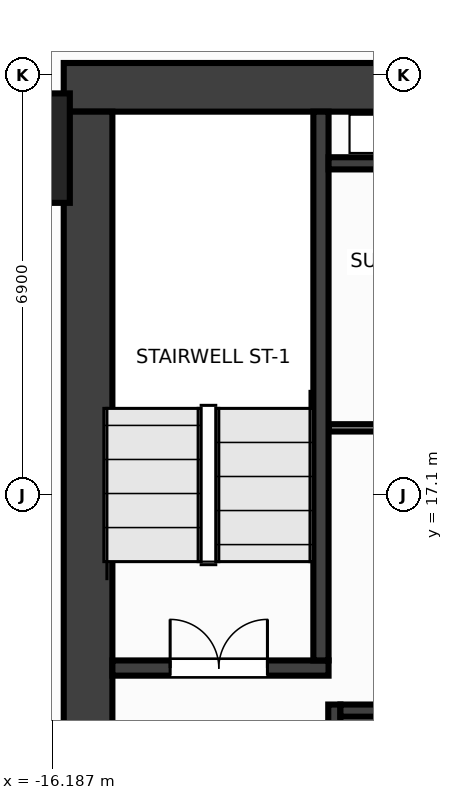
"""IFC4 building model, lengths in metres.
Left out: names, types, materials, properties, quantities, classifications, styles, units other than length and angle.
Written with IfcOpenShell. Run it as: python <this file> out.ifc"""

import sys

from ifc_helpers import new_model, si_unit, direction, frame, frame_2d, origin, origin_2d, place, context, subcontext, project, spatial, rectangle, extrude, source, transform, mapped, element, fill, save


model = new_model("IFC4")
c1 = context("Model", 3, precision=1e-05, world=origin(), true_north=direction((0.0, 1.0)))
c2 = subcontext(c1, "Body", "Model", "MODEL_VIEW")
j1 = project(units=[si_unit("LENGTHUNIT", "METRE"), si_unit("PLANEANGLEUNIT", "RADIAN")], contexts=[c1])
p1 = place(None, origin())
s1 = spatial("IfcSite", under=j1, at=p1, CompositionType="ELEMENT")
p2 = place(p1, origin())
s2 = spatial("IfcBuilding", under=s1, at=p2, CompositionType="ELEMENT")
p3 = place(p2, frame((0.0, 0.0, 41.6)))
s3 = spatial("IfcBuildingStorey", under=s2, at=p3, CompositionType="ELEMENT", Elevation=41.6)
m1 = source(origin(), c2, "Body", "SweptSolid", [
    extrude(rectangle(XDim=32.0, YDim=0.8, at=frame_2d((16.0, 0.0))), origin(), (0.0, 0.0, 1.0), 3.6),
])
p4 = place(p3, frame((-16.0, 23.8, 0.0), z_axis=(0.0, 0.0, 1.0), x_axis=(1.0, 0.0, 0.0)))
e1 = element("IfcWall", 1, at=p4, inside=s3, PredefinedType="SHEAR", context=c2, shape_type="MappedRepresentation", body=[
    mapped(m1, transform((0.0, 0.0, 0.0), x_axis=(1.0, 0.0, 0.0), y_axis=(0.0, 1.0, 0.0), z_axis=(0.0, 0.0, 1.0), scale=1.0)),
])
m2 = source(origin(), c2, "Body", "SweptSolid", [
    extrude(rectangle(XDim=12.8, YDim=0.8, at=frame_2d((6.4, 0.0))), origin(), (0.0, 0.0, 1.0), 3.6),
])
p5 = place(p3, frame((-15.6, 10.6, 0.0), z_axis=(0.0, 0.0, 1.0), x_axis=(0.0, 1.0, 0.0)))
e2 = element("IfcWall", 2, at=p5, inside=s3, PredefinedType="SHEAR", context=c2, shape_type="MappedRepresentation", body=[
    mapped(m2, transform((0.0, 0.0, 0.0), x_axis=(1.0, 0.0, 0.0), y_axis=(0.0, 1.0, 0.0), z_axis=(0.0, 0.0, 1.0), scale=1.0)),
])
m3 = source(origin(), c2, "Body", "SweptSolid", [
    extrude(rectangle(XDim=3.555, YDim=0.25, at=frame_2d((1.777, 0.0))), origin(), (0.0, 0.0, 1.0), 3.6),
])
p6 = place(p3, frame((-15.2, 14.25, 0.0), z_axis=(0.0, 0.0, 1.0), x_axis=(1.0, 0.0, 0.0)))
e3 = element("IfcWall", 3, at=p6, inside=s3, PredefinedType="SHEAR", context=c2, shape_type="MappedRepresentation", body=[
    mapped(m3, transform((0.0, 0.0, 0.0), x_axis=(1.0, 0.0, 0.0), y_axis=(0.0, 1.0, 0.0), z_axis=(0.0, 0.0, 1.0), scale=1.0)),
])
p7 = place(p6, frame((0.95, 0.0, 0.0)))
e4 = element("IfcOpeningElement", 4, at=p7, cuts=e3, PredefinedType="OPENING", context=c2, shape_type="SweptSolid", body=[
    extrude(rectangle(XDim=1.6, YDim=2.15, at=frame_2d((0.8, 1.075))), frame((0.0, 0.137, 0.0), z_axis=(0.0, -1.0, 0.0), x_axis=(1.0, 0.0, 0.0)), (0.0, 0.0, 1.0), 0.274),
])
m4 = source(origin(), c2, "Body", "SweptSolid", [
    extrude(rectangle(XDim=9.025, YDim=0.25, at=frame_2d((4.512, 0.0))), origin(), (0.0, 0.0, 1.0), 3.6),
])
p8 = place(p3, frame((-11.77, 14.375, 0.0), z_axis=(0.0, 0.0, 1.0), x_axis=(0.0, 1.0, 0.0)))
e5 = element("IfcWall", 5, at=p8, inside=s3, PredefinedType="SHEAR", context=c2, shape_type="MappedRepresentation", body=[
    mapped(m4, transform((0.0, 0.0, 0.0), x_axis=(1.0, 0.0, 0.0), y_axis=(0.0, 1.0, 0.0), z_axis=(0.0, 0.0, 1.0), scale=1.0)),
])
m5 = source(origin(), c2, "Body", "SweptSolid", [
    extrude(rectangle(XDim=3.05, YDim=0.2, at=frame_2d((1.525, 0.0))), origin(), (0.0, 0.0, 1.0), 3.6),
])
p9 = place(p3, frame((-11.55, 10.6, 0.0), z_axis=(0.0, 0.0, 1.0), x_axis=(0.0, 1.0, 0.0)))
e6 = element("IfcWall", 6, at=p9, inside=s3, PredefinedType="SHEAR", context=c2, shape_type="MappedRepresentation", body=[
    mapped(m5, transform((0.0, 0.0, 0.0), x_axis=(1.0, 0.0, 0.0), y_axis=(0.0, 1.0, 0.0), z_axis=(0.0, 0.0, 1.0), scale=1.0)),
])
p10 = place(p9, frame((0.9, 0.0, 0.0)))
e7 = element("IfcOpeningElement", 7, at=p10, cuts=e6, PredefinedType="OPENING", context=c2, shape_type="SweptSolid", body=[
    extrude(rectangle(XDim=1.1, YDim=2.15, at=frame_2d((0.55, 1.075))), frame((0.0, 0.112, 0.0), z_axis=(0.0, -1.0, 0.0), x_axis=(1.0, 0.0, 0.0)), (0.0, 0.0, 1.0), 0.224),
])
m6 = source(origin(), c2, "Body", "SweptSolid", [
    extrude(rectangle(XDim=2.825, YDim=0.2, at=frame_2d((1.413, 0.0))), origin(), (0.0, 0.0, 1.0), 3.6),
])
p11 = place(p3, frame((-11.45, 13.55, 0.0), z_axis=(0.0, 0.0, 1.0), x_axis=(1.0, 0.0, 0.0)))
e8 = element("IfcWall", 8, at=p11, inside=s3, PredefinedType="SHEAR", context=c2, shape_type="MappedRepresentation", body=[
    mapped(m6, transform((0.0, 0.0, 0.0), x_axis=(1.0, 0.0, 0.0), y_axis=(0.0, 1.0, 0.0), z_axis=(0.0, 0.0, 1.0), scale=1.0)),
])
m7 = source(origin(), c2, "Body", "SweptSolid", [
    extrude(rectangle(XDim=3.02, YDim=0.2, at=frame_2d((1.51, 0.0))), origin(), (0.0, 0.0, 1.0), 3.6),
])
p12 = place(p3, frame((-11.645, 22.55, 0.0), z_axis=(0.0, 0.0, 1.0), x_axis=(1.0, 0.0, 0.0)))
e9 = element("IfcWall", 9, at=p12, inside=s3, PredefinedType="SHEAR", context=c2, shape_type="MappedRepresentation", body=[
    mapped(m7, transform((0.0, 0.0, 0.0), x_axis=(1.0, 0.0, 0.0), y_axis=(0.0, 1.0, 0.0), z_axis=(0.0, 0.0, 1.0), scale=1.0)),
])
m8 = source(origin(), c2, "Body", "SweptSolid", [
    extrude(rectangle(XDim=1.8, YDim=1.8, at=origin_2d()), origin(), (0.0, 0.0, 1.0), 3.6),
])
p13 = place(p3, frame((-16.8, 22.8, 0.0), z_axis=(0.0, 0.0, 1.0), x_axis=(1.0, 0.0, 0.0)))
e10 = element("IfcColumn", 10, at=p13, inside=s3, PredefinedType="COLUMN", context=c2, shape_type="MappedRepresentation", body=[
    mapped(m8, transform((0.0, 0.0, 0.0), x_axis=(1.0, 0.0, 0.0), y_axis=(0.0, 1.0, 0.0), z_axis=(0.0, 0.0, 1.0), scale=1.0)),
])
m9 = source(origin(), c2, "Body", "SweptSolid", [
    extrude(rectangle(XDim=3.01, YDim=0.12, at=frame_2d((1.505, 0.0))), origin(), (0.0, 0.0, 1.0), 3.36),
])
p14 = place(p3, frame((-11.64, 18.2, 0.0), z_axis=(0.0, 0.0, 1.0), x_axis=(1.0, 0.0, 0.0)))
e11 = element("IfcWall", 11, at=p14, inside=s3, PredefinedType="PARTITIONING", context=c2, shape_type="MappedRepresentation", body=[
    mapped(m9, transform((0.0, 0.0, 0.0), x_axis=(1.0, 0.0, 0.0), y_axis=(0.0, 1.0, 0.0), z_axis=(0.0, 0.0, 1.0), scale=1.0)),
])
m10 = source(origin(), c2, "Body", "SweptSolid", [
    extrude(rectangle(XDim=1.6, YDim=2.15, at=frame_2d((0.8, 1.075))), frame((0.0, 0.025, 0.0), z_axis=(0.0, -1.0, 0.0), x_axis=(1.0, 0.0, 0.0)), (0.0, 0.0, 1.0), 0.05),
])
p15 = place(p7, origin())
e12 = element("IfcDoor", 12, at=p15, inside=s3, OperationType="DOUBLE_DOOR_SINGLE_SWING", PredefinedType="DOOR", context=c2, shape_type="MappedRepresentation", body=[
    mapped(m10, transform((0.0, 0.0, 0.0), x_axis=(1.0, 0.0, 0.0), y_axis=(0.0, 1.0, 0.0), z_axis=(0.0, 0.0, 1.0), scale=1.0)),
])
fill(e4, e12)
save(model, sys.argv[1])
